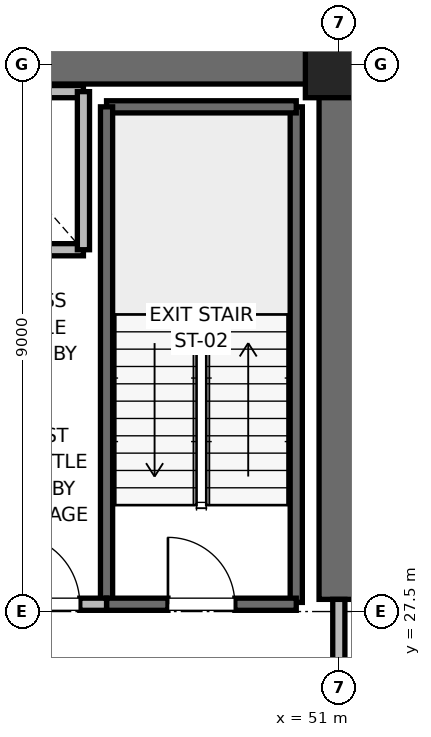
"""IFC4 building model, lengths in metres.
Left out: names, types, materials, properties, quantities, classifications, styles, units other than length and angle.
Written with IfcOpenShell. Run it as: python <this file> out.ifc"""

import sys

from ifc_helpers import new_model, si_unit, direction, frame, frame_2d, origin, origin_2d, place, context, subcontext, project, spatial, rectangle, extrude, element, fill, save


model = new_model("IFC4")
c1 = context("Model", 3, precision=1e-05, world=origin(), true_north=direction((0.0, 1.0)))
c2 = subcontext(c1, "Body", "Model", "MODEL_VIEW")
j1 = project(units=[si_unit("LENGTHUNIT", "METRE"), si_unit("PLANEANGLEUNIT", "RADIAN")], contexts=[c1])
p1 = place(None, origin())
s1 = spatial("IfcSite", under=j1, at=p1, CompositionType="ELEMENT")
p2 = place(p1, origin())
s2 = spatial("IfcBuilding", under=s1, at=p2, CompositionType="ELEMENT")
p3 = place(p2, frame((0.0, 0.0, 35.6)))
s3 = spatial("IfcBuildingStorey", under=s2, at=p3, CompositionType="ELEMENT", Elevation=35.6)
p4 = place(p3, frame((51.0, 36.5, 0.0), z_axis=(0.0, 0.0, 1.0), x_axis=(1.0, 0.0, 0.0)))
e1 = element("IfcColumn", 1, at=p4, inside=s3, PredefinedType="PILASTER", context=c2, shape_type="SweptSolid", body=[
    extrude(rectangle(XDim=1.1, YDim=1.1, at=origin_2d()), origin(), (0.0, 0.0, 1.0), 4.0),
])
p5 = place(p3, frame((45.2, 36.5, 0.0), z_axis=(0.0, 0.0, 1.0), x_axis=(1.0, 0.0, 0.0)))
e2 = element("IfcWall", 2, at=p5, inside=s3, PredefinedType="SHEAR", context=c2, shape_type="SweptSolid", body=[
    extrude(rectangle(XDim=5.8, YDim=0.65, at=frame_2d((2.9, 0.0))), origin(), (0.0, 0.0, 1.0), 3.76),
])
p6 = place(p3, frame((51.0, 27.7, 0.0), z_axis=(0.0, 0.0, 1.0), x_axis=(0.0, 1.0, 0.0)))
e3 = element("IfcWall", 3, at=p6, inside=s3, PredefinedType="SHEAR", context=c2, shape_type="SweptSolid", body=[
    extrude(rectangle(XDim=8.8, YDim=0.65, at=frame_2d((4.4, 0.0))), origin(), (0.0, 0.0, 1.0), 3.76),
])
p7 = place(p3, frame((50.3, 27.65, 0.0), z_axis=(0.0, 0.0, 1.0), x_axis=(0.0, 1.0, 0.0)))
e4 = element("IfcWall", 4, at=p7, inside=s3, PredefinedType="SOLIDWALL", context=c2, shape_type="SweptSolid", body=[
    extrude(rectangle(XDim=8.15, YDim=0.2, at=frame_2d((4.075, 0.0))), origin(), (0.0, 0.0, 1.0), 3.76),
])
p8 = place(p3, frame((47.18, 35.8, 0.0), z_axis=(0.0, 0.0, 1.0), x_axis=(1.0, 0.0, 0.0)))
e5 = element("IfcWall", 5, at=p8, inside=s3, PredefinedType="SOLIDWALL", context=c2, shape_type="SweptSolid", body=[
    extrude(rectangle(XDim=3.12, YDim=0.2, at=frame_2d((1.56, 0.0))), origin(), (0.0, 0.0, 1.0), 3.76),
])
p9 = place(p3, frame((47.18, 27.62, 0.0), z_axis=(0.0, 0.0, 1.0), x_axis=(0.0, 1.0, 0.0)))
e6 = element("IfcWall", 6, at=p9, inside=s3, PredefinedType="SOLIDWALL", context=c2, shape_type="SweptSolid", body=[
    extrude(rectangle(XDim=8.18, YDim=0.2, at=frame_2d((4.09, 0.0))), origin(), (0.0, 0.0, 1.0), 3.76),
])
p10 = place(p3, frame((47.18, 27.62, 0.0), z_axis=(0.0, 0.0, 1.0), x_axis=(1.0, 0.0, 0.0)))
e7 = element("IfcWall", 7, at=p10, inside=s3, PredefinedType="SOLIDWALL", context=c2, shape_type="SweptSolid", body=[
    extrude(rectangle(XDim=3.12, YDim=0.2, at=frame_2d((1.56, 0.0))), origin(), (0.0, 0.0, 1.0), 3.76),
])
p11 = place(p10, frame((1.01, 0.0, 0.0)))
e8 = element("IfcOpeningElement", 8, at=p11, cuts=e7, PredefinedType="OPENING", context=c2, shape_type="SweptSolid", body=[
    extrude(rectangle(XDim=1.1, YDim=2.15, at=frame_2d((0.55, 1.075))), frame((0.0, 0.1, 0.0), z_axis=(0.0, -1.0, 0.0), x_axis=(1.0, 0.0, 0.0)), (0.0, 0.0, 1.0), 0.2),
])
p12 = place(p3, frame((45.15, 27.62, 0.0), z_axis=(0.0, 0.0, 1.0), x_axis=(1.0, 0.0, 0.0)))
e9 = element("IfcWall", 9, at=p12, inside=s3, PredefinedType="PARTITIONING", context=c2, shape_type="SweptSolid", body=[
    extrude(rectangle(XDim=2.03, YDim=0.2, at=frame_2d((1.015, 0.0))), origin(), (0.0, 0.0, 1.0), 3.76),
])
p13 = place(p12, frame((0.44, 0.0, 0.0)))
e10 = element("IfcOpeningElement", 10, at=p13, cuts=e9, PredefinedType="OPENING", context=c2, shape_type="SweptSolid", body=[
    extrude(rectangle(XDim=1.15, YDim=2.2, at=frame_2d((0.575, 1.1))), frame((0.0, 0.1, 0.0), z_axis=(0.0, -1.0, 0.0), x_axis=(1.0, 0.0, 0.0)), (0.0, 0.0, 1.0), 0.2),
])
p14 = place(p3, frame((51.0, 24.3, 0.0), z_axis=(0.0, 0.0, 1.0), x_axis=(0.0, 1.0, 0.0)))
e11 = element("IfcWall", 11, at=p14, inside=s3, PredefinedType="PARTITIONING", context=c2, shape_type="SweptSolid", body=[
    extrude(rectangle(XDim=3.4, YDim=0.2, at=frame_2d((1.7, 0.0))), origin(), (0.0, 0.0, 1.0), 2.54),
])
p15 = place(p14, frame((1.125, 0.0, 0.0)))
e12 = element("IfcOpeningElement", 12, at=p15, cuts=e11, PredefinedType="OPENING", context=c2, shape_type="SweptSolid", body=[
    extrude(rectangle(XDim=1.15, YDim=2.2, at=frame_2d((0.575, 1.1))), frame((0.0, 0.1, 0.0), z_axis=(0.0, -1.0, 0.0), x_axis=(1.0, 0.0, 0.0)), (0.0, 0.0, 1.0), 0.2),
])
p16 = place(p3, frame((44.5, 33.45, 0.0), z_axis=(0.0, 0.0, 1.0), x_axis=(1.0, 0.0, 0.0)))
e13 = element("IfcWall", 13, at=p16, inside=s3, PredefinedType="SOLIDWALL", context=c2, shape_type="SweptSolid", body=[
    extrude(rectangle(XDim=2.3, YDim=0.2, at=frame_2d((1.15, 0.0))), origin(), (0.0, 0.0, 1.0), 3.76),
])
p17 = place(p3, frame((46.8, 36.05, 0.0), z_axis=(0.0, 0.0, 1.0), x_axis=(-1.0, 0.0, 0.0)))
e14 = element("IfcWall", 14, at=p17, inside=s3, PredefinedType="SOLIDWALL", context=c2, shape_type="SweptSolid", body=[
    extrude(rectangle(XDim=2.3, YDim=0.2, at=frame_2d((1.15, 0.0))), origin(), (0.0, 0.0, 1.0), 2.54),
])
p18 = place(p3, frame((46.8, 33.45, 0.0), z_axis=(0.0, 0.0, 1.0), x_axis=(0.0, 1.0, 0.0)))
e15 = element("IfcWall", 15, at=p18, inside=s3, PredefinedType="SOLIDWALL", context=c2, shape_type="SweptSolid", body=[
    extrude(rectangle(XDim=2.6, YDim=0.2, at=frame_2d((1.3, 0.0))), origin(), (0.0, 0.0, 1.0), 3.76),
])
p19 = place(p11, origin())
e16 = element("IfcDoor", 16, at=p19, inside=s3, OperationType="SINGLE_SWING_LEFT", PredefinedType="DOOR", context=c2, shape_type="SweptSolid", body=[
    extrude(rectangle(XDim=1.1, YDim=2.15, at=frame_2d((0.55, 1.075))), frame((0.0, 0.025, 0.0), z_axis=(0.0, -1.0, 0.0), x_axis=(1.0, 0.0, 0.0)), (0.0, 0.0, 1.0), 0.05),
])
fill(e8, e16)
p20 = place(p13, origin())
e17 = element("IfcDoor", 17, at=p20, inside=s3, OperationType="SINGLE_SWING_LEFT", PredefinedType="DOOR", context=c2, shape_type="SweptSolid", body=[
    extrude(rectangle(XDim=1.15, YDim=2.2, at=frame_2d((0.575, 1.1))), frame((0.0, 0.025, 0.0), z_axis=(0.0, -1.0, 0.0), x_axis=(1.0, 0.0, 0.0)), (0.0, 0.0, 1.0), 0.05),
])
fill(e10, e17)
save(model, sys.argv[1])
